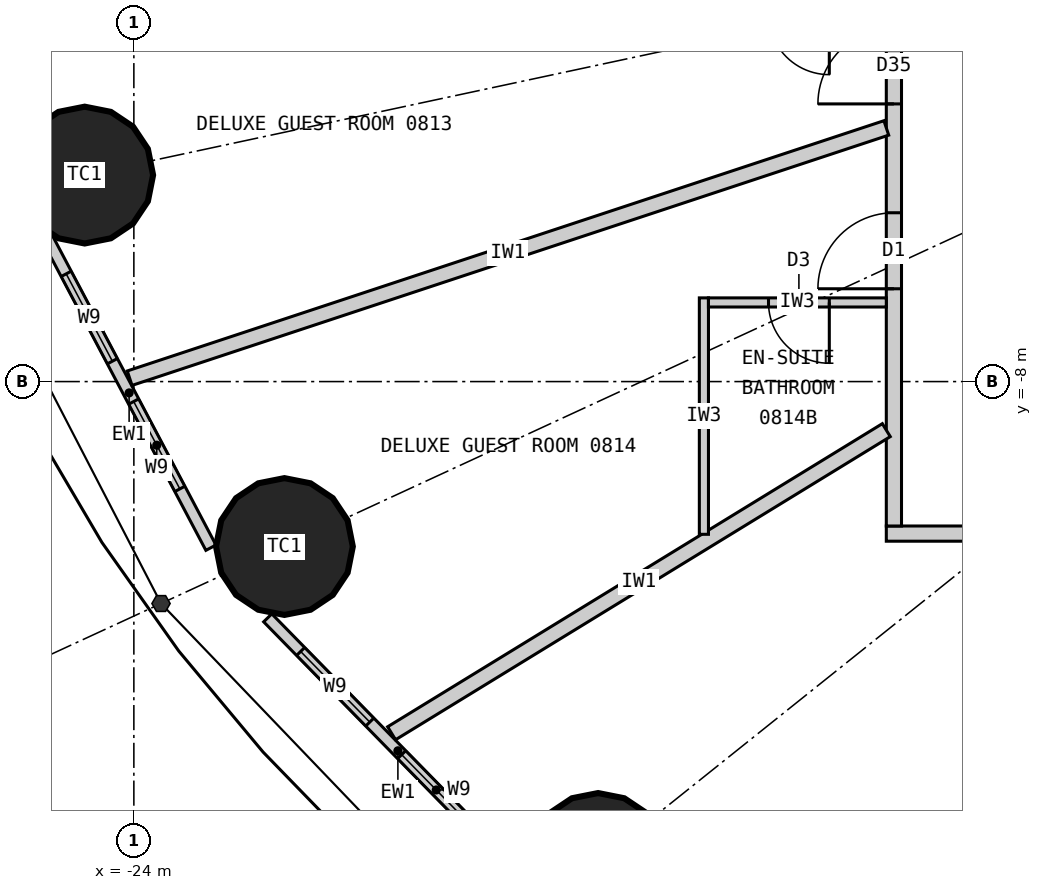
"""IFC4 building model, lengths in metres.
Left out: names, types, materials, properties, quantities, classifications, styles, units other than length and angle.
Written with IfcOpenShell. Run it as: python <this file> out.ifc"""

import sys

from ifc_helpers import new_model, si_unit, direction, frame, frame_2d, origin, origin_2d, place, context, subcontext, project, spatial, rectangle, circle, extrude, element, fill, save


model = new_model("IFC4")
c1 = context("Model", 3, precision=1e-05, world=origin(), true_north=direction((0.0, 1.0)))
c2 = subcontext(c1, "Body", "Model", "MODEL_VIEW")
j1 = project(units=[si_unit("LENGTHUNIT", "METRE"), si_unit("PLANEANGLEUNIT", "RADIAN")], contexts=[c1])
p1 = place(None, origin())
s1 = spatial("IfcSite", under=j1, at=p1, CompositionType="ELEMENT")
p2 = place(p1, origin())
s2 = spatial("IfcBuilding", under=s1, at=p2, CompositionType="ELEMENT")
p3 = place(p2, frame((0.0, 0.0, 39.3)))
s3 = spatial("IfcBuildingStorey", under=s2, at=p3, CompositionType="ELEMENT", Elevation=39.3)
for number, where, z_axis, x_axis in (
    (1, (-24.647, -5.283, 0.0), (0.0, 0.0, 1.0), (1.0, 0.0, 0.0)),
    (2, (-22.019, -10.17, 0.0), (0.0, 0.0, 1.0), (1.0, 0.0, 0.0)),
    (3, (-17.892, -14.313, 0.0), (0.0, 0.0, 1.0), (1.0, 0.0, 0.0)),
):
    element("IfcColumn", number, at=place(p3, frame(where, z_axis=z_axis, x_axis=x_axis)), inside=s3, PredefinedType="COLUMN", context=c2, shape_type="SweptSolid", body=[
        extrude(circle(Radius=0.9, at=origin_2d()), origin(), (0.0, 0.0, 1.0), 3.3),
    ])
p4 = place(p3, frame((-25.139, -6.113, 0.0), z_axis=(0.0, 0.0, 1.0), x_axis=(0.467303182954, -0.884097129959, 0.0)))
e4 = element("IfcWall", 4, at=p4, inside=s3, PredefinedType="ELEMENTEDWALL", context=c2, shape_type="SweptSolid", body=[
    extrude(rectangle(XDim=4.606, YDim=0.15, at=frame_2d((2.303, 0.0))), origin(), (0.0, 0.0, 1.0), 3.12),
])
p5 = place(p4, frame((0.531, 0.0, 0.9)))
e5 = element("IfcOpeningElement", 5, at=p5, cuts=e4, PredefinedType="OPENING", context=c2, shape_type="SweptSolid", body=[
    extrude(rectangle(XDim=1.3, YDim=1.9, at=frame_2d((0.65, 0.95))), frame((0.0, 0.085, 0.0), z_axis=(0.0, -1.0, 0.0), x_axis=(1.0, 0.0, 0.0)), (0.0, 0.0, 1.0), 0.17),
])
p6 = place(p4, frame((2.432, 0.0, 0.9)))
e6 = element("IfcOpeningElement", 6, at=p6, cuts=e4, PredefinedType="OPENING", context=c2, shape_type="SweptSolid", body=[
    extrude(rectangle(XDim=1.3, YDim=1.9, at=frame_2d((0.65, 0.95))), frame((0.0, 0.085, 0.0), z_axis=(0.0, -1.0, 0.0), x_axis=(1.0, 0.0, 0.0)), (0.0, 0.0, 1.0), 0.17),
])
p7 = place(p3, frame((-22.239, -11.108, 0.0), z_axis=(0.0, 0.0, 1.0), x_axis=(0.699612594083, -0.714522370679, 0.0)))
e7 = element("IfcWall", 7, at=p7, inside=s3, PredefinedType="ELEMENTEDWALL", context=c2, shape_type="SweptSolid", body=[
    extrude(rectangle(XDim=4.896, YDim=0.15, at=frame_2d((2.448, 0.0))), origin(), (0.0, 0.0, 1.0), 3.12),
])
p8 = place(p7, frame((0.619, 0.0, 0.9)))
e8 = element("IfcOpeningElement", 8, at=p8, cuts=e7, PredefinedType="OPENING", context=c2, shape_type="SweptSolid", body=[
    extrude(rectangle(XDim=1.3, YDim=1.9, at=frame_2d((0.65, 0.95))), frame((0.0, 0.085, 0.0), z_axis=(0.0, -1.0, 0.0), x_axis=(1.0, 0.0, 0.0)), (0.0, 0.0, 1.0), 0.17),
])
p9 = place(p7, frame((2.519, 0.0, 0.9)))
e9 = element("IfcOpeningElement", 9, at=p9, cuts=e7, PredefinedType="OPENING", context=c2, shape_type="SweptSolid", body=[
    extrude(rectangle(XDim=1.3, YDim=1.9, at=frame_2d((0.65, 0.95))), frame((0.0, 0.085, 0.0), z_axis=(0.0, -1.0, 0.0), x_axis=(1.0, 0.0, 0.0)), (0.0, 0.0, 1.0), 0.17),
])
p10 = place(p3, frame((14.1, -10.0, 0.0), z_axis=(0.0, 0.0, 1.0), x_axis=(-1.0, 0.0, 0.0)))
e10 = element("IfcWall", 10, at=p10, inside=s3, PredefinedType="PARTITIONING", context=c2, shape_type="SweptSolid", body=[
    extrude(rectangle(XDim=28.2, YDim=0.2, at=frame_2d((14.1, 0.0))), origin(), (0.0, 0.0, 1.0), 3.12),
])
p11 = place(p10, frame((21.948, 0.0, 0.0)))
e11 = element("IfcOpeningElement", 11, at=p11, cuts=e10, PredefinedType="OPENING", context=c2, shape_type="SweptSolid", body=[
    extrude(rectangle(XDim=1.0, YDim=2.2, at=frame_2d((0.5, 1.1))), frame((0.0, 0.11, 0.0), z_axis=(0.0, -1.0, 0.0), x_axis=(1.0, 0.0, 0.0)), (0.0, 0.0, 1.0), 0.22),
])
p12 = place(p10, frame((15.684, 0.0, 0.0)))
e12 = element("IfcOpeningElement", 12, at=p12, cuts=e10, PredefinedType="OPENING", context=c2, shape_type="SweptSolid", body=[
    extrude(rectangle(XDim=1.0, YDim=2.2, at=frame_2d((0.5, 1.1))), frame((0.0, 0.11, 0.0), z_axis=(0.0, -1.0, 0.0), x_axis=(1.0, 0.0, 0.0)), (0.0, 0.0, 1.0), 0.22),
])
p13 = place(p10, frame((8.875, 0.0, 0.0)))
e13 = element("IfcOpeningElement", 13, at=p13, cuts=e10, PredefinedType="OPENING", context=c2, shape_type="SweptSolid", body=[
    extrude(rectangle(XDim=1.0, YDim=2.2, at=frame_2d((0.5, 1.1))), frame((0.0, 0.11, 0.0), z_axis=(0.0, -1.0, 0.0), x_axis=(1.0, 0.0, 0.0)), (0.0, 0.0, 1.0), 0.22),
])
p14 = place(p3, frame((-14.0, 9.9, 0.0), z_axis=(0.0, 0.0, 1.0), x_axis=(0.0, -1.0, 0.0)))
e14 = element("IfcWall", 14, at=p14, inside=s3, PredefinedType="PARTITIONING", context=c2, shape_type="SweptSolid", body=[
    extrude(rectangle(XDim=19.8, YDim=0.2, at=frame_2d((9.9, 0.0))), origin(), (0.0, 0.0, 1.0), 3.12),
])
p15 = place(p14, frame((0.103, 0.0, 0.0)))
e15 = element("IfcOpeningElement", 15, at=p15, cuts=e14, PredefinedType="OPENING", context=c2, shape_type="SweptSolid", body=[
    extrude(rectangle(XDim=1.0, YDim=2.2, at=frame_2d((0.5, 1.1))), frame((0.0, 0.11, 0.0), z_axis=(0.0, -1.0, 0.0), x_axis=(1.0, 0.0, 0.0)), (0.0, 0.0, 1.0), 0.22),
])
p16 = place(p14, frame((5.252, 0.0, 0.0)))
e16 = element("IfcOpeningElement", 16, at=p16, cuts=e14, PredefinedType="OPENING", context=c2, shape_type="SweptSolid", body=[
    extrude(rectangle(XDim=1.0, YDim=2.0, at=frame_2d((0.5, 1.0))), frame((0.0, 0.11, 0.0), z_axis=(0.0, -1.0, 0.0), x_axis=(1.0, 0.0, 0.0)), (0.0, 0.0, 1.0), 0.22),
])
p17 = place(p14, frame((10.117, 0.0, 0.0)))
e17 = element("IfcOpeningElement", 17, at=p17, cuts=e14, PredefinedType="OPENING", context=c2, shape_type="SweptSolid", body=[
    extrude(rectangle(XDim=1.0, YDim=2.2, at=frame_2d((0.5, 1.1))), frame((0.0, 0.11, 0.0), z_axis=(0.0, -1.0, 0.0), x_axis=(1.0, 0.0, 0.0)), (0.0, 0.0, 1.0), 0.22),
])
p18 = place(p14, frame((13.247, 0.0, 0.0)))
e18 = element("IfcOpeningElement", 18, at=p18, cuts=e14, PredefinedType="OPENING", context=c2, shape_type="SweptSolid", body=[
    extrude(rectangle(XDim=1.0, YDim=2.0, at=frame_2d((0.5, 1.0))), frame((0.0, 0.11, 0.0), z_axis=(0.0, -1.0, 0.0), x_axis=(1.0, 0.0, 0.0)), (0.0, 0.0, 1.0), 0.22),
])
p19 = place(p14, frame((15.679, 0.0, 0.0)))
e19 = element("IfcOpeningElement", 19, at=p19, cuts=e14, PredefinedType="OPENING", context=c2, shape_type="SweptSolid", body=[
    extrude(rectangle(XDim=1.0, YDim=2.2, at=frame_2d((0.5, 1.1))), frame((0.0, 0.11, 0.0), z_axis=(0.0, -1.0, 0.0), x_axis=(1.0, 0.0, 0.0)), (0.0, 0.0, 1.0), 0.22),
])
p20 = place(p3, frame((-14.1, -4.663, 0.0), z_axis=(0.0, 0.0, 1.0), x_axis=(-0.949432655039, -0.31397075269, 0.0)))
e20 = element("IfcWall", 20, at=p20, inside=s3, PredefinedType="PARTITIONING", context=c2, shape_type="SweptSolid", body=[
    extrude(rectangle(XDim=10.486, YDim=0.2, at=frame_2d((5.243, 0.0))), origin(), (0.0, 0.0, 1.0), 3.12),
])
p21 = place(p3, frame((-14.1, -8.639, 0.0), z_axis=(0.0, 0.0, 1.0), x_axis=(-0.852672493023, -0.522445805459, 0.0)))
e21 = element("IfcWall", 21, at=p21, inside=s3, PredefinedType="PARTITIONING", context=c2, shape_type="SweptSolid", body=[
    extrude(rectangle(XDim=7.633, YDim=0.2, at=frame_2d((3.817, 0.0))), origin(), (0.0, 0.0, 1.0), 3.12),
])
p22 = place(p3, frame((-16.5, -10.01, 0.0), z_axis=(0.0, 0.0, 1.0), x_axis=(0.0, 1.0, 0.0)))
e22 = element("IfcWall", 22, at=p22, inside=s3, PredefinedType="PARTITIONING", context=c2, shape_type="SweptSolid", body=[
    extrude(rectangle(XDim=3.111, YDim=0.12, at=frame_2d((1.555, 0.0))), origin(), (0.0, 0.0, 1.0), 3.12),
])
p23 = place(p3, frame((-14.1, -6.959, 0.0), z_axis=(0.0, 0.0, 1.0), x_axis=(-1.0, 0.0, 0.0)))
e23 = element("IfcWall", 23, at=p23, inside=s3, PredefinedType="PARTITIONING", context=c2, shape_type="SweptSolid", body=[
    extrude(rectangle(XDim=2.34, YDim=0.12, at=frame_2d((1.17, 0.0))), origin(), (0.0, 0.0, 1.0), 3.12),
])
p24 = place(p23, frame((0.75, 0.0, 0.0)))
e24 = element("IfcOpeningElement", 24, at=p24, cuts=e23, PredefinedType="OPENING", context=c2, shape_type="SweptSolid", body=[
    extrude(rectangle(XDim=0.8, YDim=2.1, at=frame_2d((0.4, 1.05))), frame((0.0, 0.07, 0.0), z_axis=(0.0, -1.0, 0.0), x_axis=(1.0, 0.0, 0.0)), (0.0, 0.0, 1.0), 0.14),
])
p25 = place(p5, origin())
e25 = element("IfcWindow", 25, at=p25, inside=s3, PartitioningType="SINGLE_PANEL", PredefinedType="WINDOW", context=c2, shape_type="SweptSolid", body=[
    extrude(rectangle(XDim=1.3, YDim=1.9, at=frame_2d((0.65, 0.95))), frame((0.0, 0.03, 0.0), z_axis=(0.0, -1.0, 0.0), x_axis=(1.0, 0.0, 0.0)), (0.0, 0.0, 1.0), 0.06),
])
fill(e5, e25)
p26 = place(p6, origin())
e26 = element("IfcWindow", 26, at=p26, inside=s3, PartitioningType="SINGLE_PANEL", PredefinedType="WINDOW", context=c2, shape_type="SweptSolid", body=[
    extrude(rectangle(XDim=1.3, YDim=1.9, at=frame_2d((0.65, 0.95))), frame((0.0, 0.03, 0.0), z_axis=(0.0, -1.0, 0.0), x_axis=(1.0, 0.0, 0.0)), (0.0, 0.0, 1.0), 0.06),
])
fill(e6, e26)
p27 = place(p8, origin())
e27 = element("IfcWindow", 27, at=p27, inside=s3, PartitioningType="SINGLE_PANEL", PredefinedType="WINDOW", context=c2, shape_type="SweptSolid", body=[
    extrude(rectangle(XDim=1.3, YDim=1.9, at=frame_2d((0.65, 0.95))), frame((0.0, 0.03, 0.0), z_axis=(0.0, -1.0, 0.0), x_axis=(1.0, 0.0, 0.0)), (0.0, 0.0, 1.0), 0.06),
])
fill(e8, e27)
p28 = place(p9, origin())
e28 = element("IfcWindow", 28, at=p28, inside=s3, PartitioningType="SINGLE_PANEL", PredefinedType="WINDOW", context=c2, shape_type="SweptSolid", body=[
    extrude(rectangle(XDim=1.3, YDim=1.9, at=frame_2d((0.65, 0.95))), frame((0.0, 0.03, 0.0), z_axis=(0.0, -1.0, 0.0), x_axis=(1.0, 0.0, 0.0)), (0.0, 0.0, 1.0), 0.06),
])
fill(e9, e28)
p29 = place(p18, origin())
e29 = element("IfcDoor", 29, at=p29, inside=s3, OperationType="SINGLE_SWING_RIGHT", PredefinedType="DOOR", context=c2, shape_type="SweptSolid", body=[
    extrude(rectangle(XDim=1.0, YDim=2.0, at=frame_2d((0.5, 1.0))), frame((0.0, 0.025, 0.0), z_axis=(0.0, -1.0, 0.0), x_axis=(1.0, 0.0, 0.0)), (0.0, 0.0, 1.0), 0.05),
])
fill(e18, e29)
p30 = place(p24, origin())
e30 = element("IfcDoor", 30, at=p30, inside=s3, OperationType="SINGLE_SWING_LEFT", PredefinedType="DOOR", context=c2, shape_type="SweptSolid", body=[
    extrude(rectangle(XDim=0.8, YDim=2.1, at=frame_2d((0.4, 1.05))), frame((0.0, 0.025, 0.0), z_axis=(0.0, -1.0, 0.0), x_axis=(1.0, 0.0, 0.0)), (0.0, 0.0, 1.0), 0.05),
])
fill(e24, e30)
p31 = place(p19, origin())
e31 = element("IfcDoor", 31, at=p31, inside=s3, OperationType="SINGLE_SWING_RIGHT", PredefinedType="DOOR", context=c2, shape_type="SweptSolid", body=[
    extrude(rectangle(XDim=1.0, YDim=2.2, at=frame_2d((0.5, 1.1))), frame((0.0, 0.025, 0.0), z_axis=(0.0, -1.0, 0.0), x_axis=(1.0, 0.0, 0.0)), (0.0, 0.0, 1.0), 0.05),
])
fill(e19, e31)
save(model, sys.argv[1])
